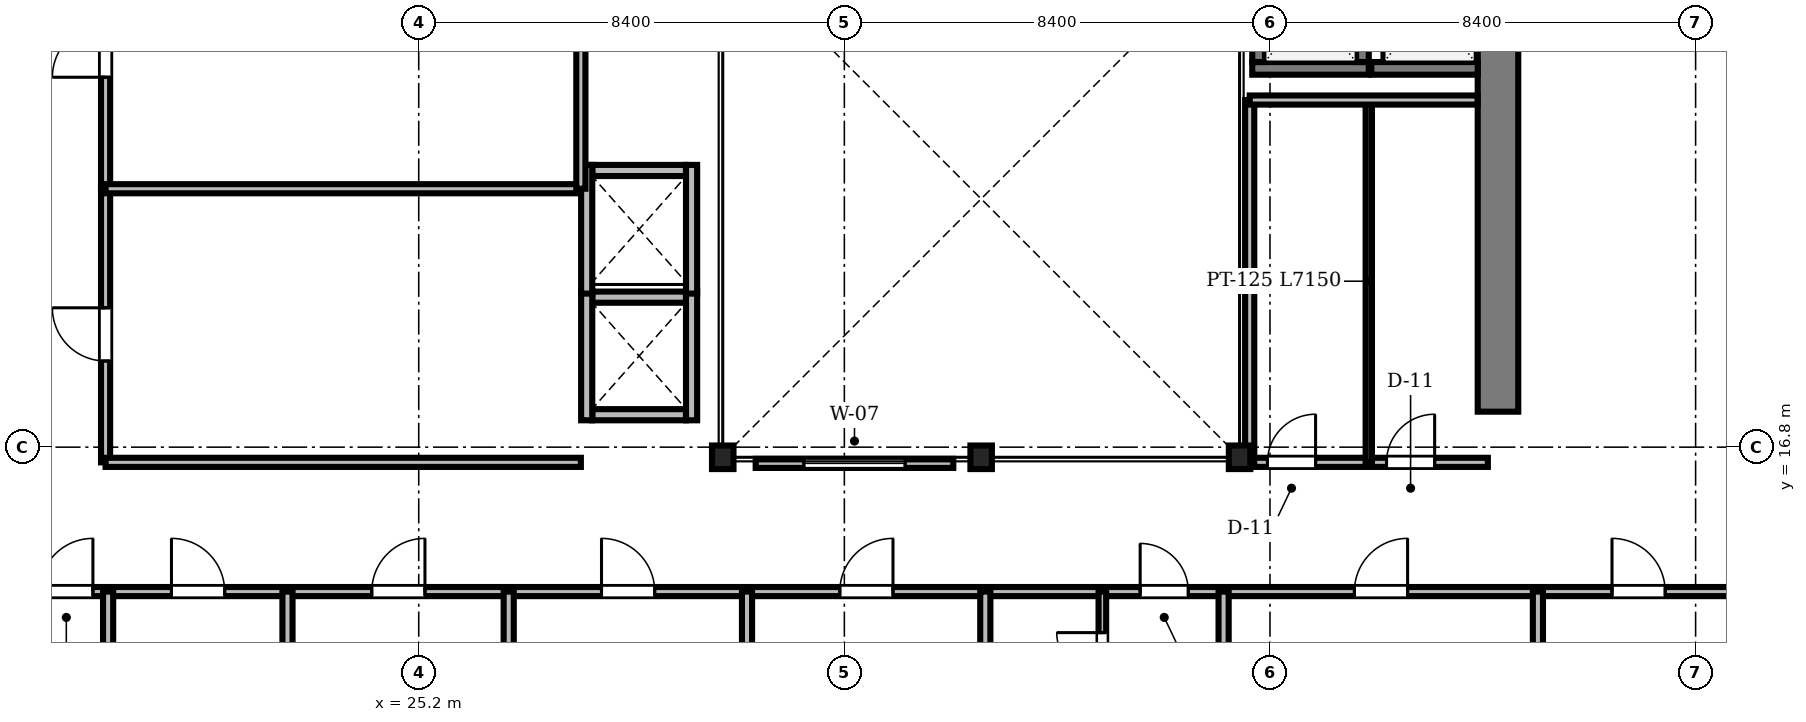
"""IFC4 building model, lengths in metres.
Left out: names, types, materials, properties, quantities, classifications, styles, units other than length and angle.
Written with IfcOpenShell. Run it as: python <this file> out.ifc"""

import sys

from ifc_helpers import new_model, si_unit, direction, frame, frame_2d, origin, origin_2d, place, context, subcontext, project, spatial, rectangle, i_section, extrude, source, transform, mapped, element, fill, save


model = new_model("IFC4")
c1 = context("Model", 3, precision=1e-05, world=origin(), true_north=direction((0.0, 1.0)))
c2 = subcontext(c1, "Body", "Model", "MODEL_VIEW")
j1 = project(units=[si_unit("LENGTHUNIT", "METRE"), si_unit("PLANEANGLEUNIT", "RADIAN")], contexts=[c1])
p1 = place(None, origin())
s1 = spatial("IfcSite", under=j1, at=p1, CompositionType="ELEMENT")
p2 = place(p1, origin())
s2 = spatial("IfcBuilding", under=s1, at=p2, CompositionType="ELEMENT")
p3 = place(p2, frame((0.0, 0.0, 155.7)))
s3 = spatial("IfcBuildingStorey", under=s2, at=p3, CompositionType="ELEMENT", Elevation=155.7)
m1 = source(origin(), c2, "Body", "SweptSolid", [
    extrude(rectangle(XDim=13.15, YDim=0.8, at=frame_2d((6.575, 0.0))), origin(), (0.0, 0.0, 1.0), 3.46),
])
p4 = place(p3, frame((46.5, 17.5, 0.0), z_axis=(0.0, 0.0, 1.0), x_axis=(0.0, 1.0, 0.0)))
e1 = element("IfcWall", 1, at=p4, inside=s3, PredefinedType="SHEAR", context=c2, shape_type="MappedRepresentation", body=[
    mapped(m1, transform((0.0, 0.0, 0.0), scale=1.0)),
])
m2 = source(origin(), c2, "Body", "SweptSolid", [
    extrude(i_section(OverallWidth=0.424, OverallDepth=0.465, WebThickness=0.035, FlangeThickness=0.056, FilletRadius=0.015, at=origin_2d()), origin(), (0.0, 0.0, 1.0), 3.46),
])
for number, where, z_axis, x_axis in (
    (2, (31.2, 16.6, 0.0), (0.0, 0.0, 1.0), (1.0, 0.0, 0.0)),
    (3, (36.3, 16.6, 0.0), (0.0, 0.0, 1.0), (1.0, 0.0, 0.0)),
    (4, (41.4, 16.6, 0.0), (0.0, 0.0, 1.0), (1.0, 0.0, 0.0)),
):
    element("IfcColumn", number, at=place(p3, frame(where, z_axis=z_axis, x_axis=x_axis)), inside=s3, PredefinedType="COLUMN", context=c2, shape_type="MappedRepresentation", body=[
        mapped(m2, transform((0.0, 0.0, 0.0), scale=1.0)),
    ])
m3 = source(origin(), c2, "Body", "SweptSolid", [
    extrude(rectangle(XDim=1.85, YDim=0.22, at=frame_2d((0.925, 0.0))), origin(), (0.0, 0.0, 1.0), 3.46),
])
for number, where, z_axis, x_axis in (
    (5, (28.625, 17.44, 0.0), (0.0, 0.0, 1.0), (1.0, 0.0, 0.0)),
    (6, (28.625, 19.76, 0.0), (0.0, 0.0, 1.0), (1.0, 0.0, 0.0)),
):
    element("IfcWall", number, at=place(p3, frame(where, z_axis=z_axis, x_axis=x_axis)), inside=s3, PredefinedType="SOLIDWALL", context=c2, shape_type="MappedRepresentation", body=[
        mapped(m3, transform((0.0, 0.0, 0.0), scale=1.0)),
    ])
m4 = source(origin(), c2, "Body", "SweptSolid", [
    extrude(rectangle(XDim=2.54, YDim=0.22, at=frame_2d((1.27, 0.0))), origin(), (0.0, 0.0, 1.0), 3.46),
])
for number, where, z_axis, x_axis in (
    (7, (28.515, 17.33, 0.0), (0.0, 0.0, 1.0), (0.0, 1.0, 0.0)),
    (8, (30.585, 17.33, 0.0), (0.0, 0.0, 1.0), (0.0, 1.0, 0.0)),
):
    element("IfcWall", number, at=place(p3, frame(where, z_axis=z_axis, x_axis=x_axis)), inside=s3, PredefinedType="SOLIDWALL", context=c2, shape_type="MappedRepresentation", body=[
        mapped(m4, transform((0.0, 0.0, 0.0), scale=1.0)),
    ])
p5 = place(p3, frame((28.625, 22.26, 0.0), z_axis=(0.0, 0.0, 1.0), x_axis=(1.0, 0.0, 0.0)))
e9 = element("IfcWall", 9, at=p5, inside=s3, PredefinedType="SOLIDWALL", context=c2, shape_type="MappedRepresentation", body=[
    mapped(m3, transform((0.0, 0.0, 0.0), scale=1.0)),
])
for number, where, z_axis, x_axis in (
    (10, (28.515, 19.83, 0.0), (0.0, 0.0, 1.0), (0.0, 1.0, 0.0)),
    (11, (30.585, 19.83, 0.0), (0.0, 0.0, 1.0), (0.0, 1.0, 0.0)),
):
    element("IfcWall", number, at=place(p3, frame(where, z_axis=z_axis, x_axis=x_axis)), inside=s3, PredefinedType="SOLIDWALL", context=c2, shape_type="MappedRepresentation", body=[
        mapped(m4, transform((0.0, 0.0, 0.0), scale=1.0)),
    ])
m5 = source(origin(), c2, "Body", "SweptSolid", [
    extrude(rectangle(XDim=2.3, YDim=0.25, at=frame_2d((1.15, 0.0))), origin(), (0.0, 0.0, 1.0), 3.46),
])
for number, where, z_axis, x_axis in (
    (12, (41.65, 24.275, 0.0), (0.0, 0.0, 1.0), (1.0, 0.0, 0.0)),
    (13, (41.775, 24.4, 0.0), (0.0, 0.0, 1.0), (0.0, 1.0, 0.0)),
    (14, (43.825, 24.4, 0.0), (0.0, 0.0, 1.0), (0.0, 1.0, 0.0)),
):
    element("IfcWall", number, at=place(p3, frame(where, z_axis=z_axis, x_axis=x_axis)), inside=s3, PredefinedType="SOLIDWALL", context=c2, shape_type="MappedRepresentation", body=[
        mapped(m5, transform((0.0, 0.0, 0.0), scale=1.0)),
    ])
m6 = source(origin(), c2, "Body", "SweptSolid", [
    extrude(rectangle(XDim=2.1, YDim=0.25, at=frame_2d((1.05, 0.0))), origin(), (0.0, 0.0, 1.0), 3.46),
])
p6 = place(p3, frame((44.0, 24.275, 0.0), z_axis=(0.0, 0.0, 1.0), x_axis=(1.0, 0.0, 0.0)))
e15 = element("IfcWall", 15, at=p6, inside=s3, PredefinedType="SOLIDWALL", context=c2, shape_type="MappedRepresentation", body=[
    mapped(m6, transform((0.0, 0.0, 0.0), scale=1.0)),
])
m7 = source(origin(), c2, "Body", "SweptSolid", [
    extrude(rectangle(XDim=46.156, YDim=0.18, at=frame_2d((23.078, 0.0))), origin(), (0.0, 0.0, 1.0), 2.702),
])
p7 = place(p3, frame((6.922, 13.95, 0.0), z_axis=(0.0, 0.0, 1.0), x_axis=(1.0, 0.0, 0.0)))
e16 = element("IfcWall", 16, at=p7, inside=s3, PredefinedType="PARTITIONING", context=c2, shape_type="MappedRepresentation", body=[
    mapped(m7, transform((0.0, 0.0, 0.0), scale=1.0)),
])
m8 = source(origin(), c2, "Body", "SweptSolid", [
    extrude(rectangle(XDim=1.05, YDim=2.2, at=frame_2d((0.525, 1.1))), frame((0.0, 0.1, 0.0), z_axis=(0.0, -1.0, 0.0), x_axis=(1.0, 0.0, 0.0)), (0.0, 0.0, 1.0), 0.2),
])
p8 = place(p7, frame((10.798, 0.0, 0.0)))
e17 = element("IfcOpeningElement", 17, at=p8, cuts=e16, PredefinedType="OPENING", context=c2, shape_type="MappedRepresentation", body=[
    mapped(m8, transform((0.0, 0.0, 0.0), scale=1.0)),
])
p9 = place(p7, frame((13.398, 0.0, 0.0)))
e18 = element("IfcOpeningElement", 18, at=p9, cuts=e16, PredefinedType="OPENING", context=c2, shape_type="MappedRepresentation", body=[
    mapped(m8, transform((0.0, 0.0, 0.0), scale=1.0)),
])
p10 = place(p7, frame((17.351, 0.0, 0.0)))
e19 = element("IfcOpeningElement", 19, at=p10, cuts=e16, PredefinedType="OPENING", context=c2, shape_type="MappedRepresentation", body=[
    mapped(m8, transform((0.0, 0.0, 0.0), scale=1.0)),
])
p11 = place(p7, frame((21.885, 0.0, 0.0)))
e20 = element("IfcOpeningElement", 20, at=p11, cuts=e16, PredefinedType="OPENING", context=c2, shape_type="MappedRepresentation", body=[
    mapped(m8, transform((0.0, 0.0, 0.0), scale=1.0)),
])
p12 = place(p7, frame((26.588, 0.0, 0.0)))
e21 = element("IfcOpeningElement", 21, at=p12, cuts=e16, PredefinedType="OPENING", context=c2, shape_type="MappedRepresentation", body=[
    mapped(m8, transform((0.0, 0.0, 0.0), scale=1.0)),
])
m9 = source(origin(), c2, "Body", "SweptSolid", [
    extrude(rectangle(XDim=0.95, YDim=2.15, at=frame_2d((0.475, 1.075))), frame((0.0, 0.1, 0.0), z_axis=(0.0, -1.0, 0.0), x_axis=(1.0, 0.0, 0.0)), (0.0, 0.0, 1.0), 0.2),
])
p13 = place(p7, frame((32.516, 0.0, 0.0)))
e22 = element("IfcOpeningElement", 22, at=p13, cuts=e16, PredefinedType="OPENING", context=c2, shape_type="MappedRepresentation", body=[
    mapped(m9, transform((0.0, 0.0, 0.0), scale=1.0)),
])
p14 = place(p7, frame((36.744, 0.0, 0.0)))
e23 = element("IfcOpeningElement", 23, at=p14, cuts=e16, PredefinedType="OPENING", context=c2, shape_type="MappedRepresentation", body=[
    mapped(m8, transform((0.0, 0.0, 0.0), scale=1.0)),
])
p15 = place(p7, frame((41.828, 0.0, 0.0)))
e24 = element("IfcOpeningElement", 24, at=p15, cuts=e16, PredefinedType="OPENING", context=c2, shape_type="MappedRepresentation", body=[
    mapped(m8, transform((0.0, 0.0, 0.0), scale=1.0)),
])
m10 = source(origin(), c2, "Body", "SweptSolid", [
    extrude(rectangle(XDim=6.54, YDim=0.18, at=frame_2d((3.27, 0.0))), origin(), (0.0, 0.0, 1.0), 2.852),
])
p16 = place(p3, frame((19.02, 21.9, 0.0), z_axis=(0.0, 0.0, 1.0), x_axis=(0.0, 1.0, 0.0)))
e25 = element("IfcWall", 25, at=p16, inside=s3, PredefinedType="PARTITIONING", context=c2, shape_type="MappedRepresentation", body=[
    mapped(m10, transform((0.0, 0.0, 0.0), scale=1.0)),
])
p17 = place(p16, frame((2.2, 0.0, 0.0)))
e26 = element("IfcOpeningElement", 26, at=p17, cuts=e25, PredefinedType="OPENING", context=c2, shape_type="MappedRepresentation", body=[
    mapped(m8, transform((0.0, 0.0, 0.0), scale=1.0)),
])
m11 = source(origin(), c2, "Body", "SweptSolid", [
    extrude(rectangle(XDim=5.4, YDim=0.18, at=frame_2d((2.7, 0.0))), origin(), (0.0, 0.0, 1.0), 2.852),
])
p18 = place(p3, frame((19.02, 16.5, 0.0), z_axis=(0.0, 0.0, 1.0), x_axis=(0.0, 1.0, 0.0)))
e27 = element("IfcWall", 27, at=p18, inside=s3, PredefinedType="PARTITIONING", context=c2, shape_type="MappedRepresentation", body=[
    mapped(m11, transform((0.0, 0.0, 0.0), scale=1.0)),
])
p19 = place(p18, frame((2.0, 0.0, 0.0)))
e28 = element("IfcOpeningElement", 28, at=p19, cuts=e27, PredefinedType="OPENING", context=c2, shape_type="MappedRepresentation", body=[
    mapped(m8, transform((0.0, 0.0, 0.0), scale=1.0)),
])
m12 = source(origin(), c2, "Body", "SweptSolid", [
    extrude(rectangle(XDim=4.7, YDim=0.18, at=frame_2d((2.35, 0.0))), origin(), (0.0, 0.0, 1.0), 2.852),
])
p20 = place(p3, frame((41.6, 16.5, 0.0), z_axis=(0.0, 0.0, 1.0), x_axis=(1.0, 0.0, 0.0)))
e29 = element("IfcWall", 29, at=p20, inside=s3, PredefinedType="PARTITIONING", context=c2, shape_type="MappedRepresentation", body=[
    mapped(m12, transform((0.0, 0.0, 0.0), scale=1.0)),
])
p21 = place(p20, frame((0.35, 0.0, 0.0)))
e30 = element("IfcOpeningElement", 30, at=p21, cuts=e29, PredefinedType="OPENING", context=c2, shape_type="MappedRepresentation", body=[
    mapped(m9, transform((0.0, 0.0, 0.0), scale=1.0)),
])
p22 = place(p20, frame((2.7, 0.0, 0.0)))
e31 = element("IfcOpeningElement", 31, at=p22, cuts=e29, PredefinedType="OPENING", context=c2, shape_type="MappedRepresentation", body=[
    mapped(m9, transform((0.0, 0.0, 0.0), scale=1.0)),
])
m13 = source(origin(), c2, "Body", "SweptSolid", [
    extrude(rectangle(XDim=2.36, YDim=0.15, at=frame_2d((1.18, 0.0))), origin(), (0.0, 0.0, 1.0), 3.122),
])
p23 = place(p3, frame((38.692, 11.59, 0.0), z_axis=(0.0, 0.0, 1.0), x_axis=(0.0, 1.0, 0.0)))
e32 = element("IfcWall", 32, at=p23, inside=s3, PredefinedType="PARTITIONING", context=c2, shape_type="MappedRepresentation", body=[
    mapped(m13, transform((0.0, 0.0, 0.0), scale=1.0)),
])
m14 = source(origin(), c2, "Body", "SweptSolid", [
    extrude(rectangle(XDim=0.9, YDim=2.1, at=frame_2d((0.45, 1.05))), frame((0.0, 0.085, 0.0), z_axis=(0.0, -1.0, 0.0), x_axis=(1.0, 0.0, 0.0)), (0.0, 0.0, 1.0), 0.17),
])
p24 = place(p23, frame((0.65, 0.0, 0.0)))
e33 = element("IfcOpeningElement", 33, at=p24, cuts=e32, PredefinedType="OPENING", context=c2, shape_type="MappedRepresentation", body=[
    mapped(m14, transform((0.0, 0.0, 0.0), scale=1.0)),
])
m15 = source(origin(), c2, "Body", "SweptSolid", [
    extrude(rectangle(XDim=11.828, YDim=0.2, at=frame_2d((5.914, 0.0))), origin(), (0.0, 0.0, 1.0), 2.702),
])
for number, where, z_axis, x_axis in (
    (34, (19.07, 2.122, 0.0), (0.0, 0.0, 1.0), (0.0, 1.0, 0.0)),
    (35, (22.61, 2.122, 0.0), (0.0, 0.0, 1.0), (0.0, 1.0, 0.0)),
):
    element("IfcWall", number, at=place(p3, frame(where, z_axis=z_axis, x_axis=x_axis)), inside=s3, PredefinedType="PARTITIONING", context=c2, shape_type="MappedRepresentation", body=[
        mapped(m15, transform((0.0, 0.0, 0.0), scale=1.0)),
    ])
m16 = source(origin(), c2, "Body", "SweptSolid", [
    extrude(rectangle(XDim=12.02, YDim=0.2, at=frame_2d((6.01, 0.0))), origin(), (0.0, 0.0, 1.0), 2.702),
])
for number, where, z_axis, x_axis in (
    (36, (26.976, 1.93, 0.0), (0.0, 0.0, 1.0), (0.0, 1.0, 0.0)),
    (37, (31.679, 1.93, 0.0), (0.0, 0.0, 1.0), (0.0, 1.0, 0.0)),
):
    element("IfcWall", number, at=place(p3, frame(where, z_axis=z_axis, x_axis=x_axis)), inside=s3, PredefinedType="PARTITIONING", context=c2, shape_type="MappedRepresentation", body=[
        mapped(m16, transform((0.0, 0.0, 0.0), scale=1.0)),
    ])
for number, where, z_axis, x_axis in (
    (38, (36.382, 2.122, 0.0), (0.0, 0.0, 1.0), (0.0, 1.0, 0.0)),
    (39, (41.085, 2.122, 0.0), (0.0, 0.0, 1.0), (0.0, 1.0, 0.0)),
    (40, (47.288, 2.122, 0.0), (0.0, 0.0, 1.0), (0.0, 1.0, 0.0)),
):
    element("IfcWall", number, at=place(p3, frame(where, z_axis=z_axis, x_axis=x_axis)), inside=s3, PredefinedType="PARTITIONING", context=c2, shape_type="MappedRepresentation", body=[
        mapped(m15, transform((0.0, 0.0, 0.0), scale=1.0)),
    ])
m17 = source(origin(), c2, "Body", "SweptSolid", [
    extrude(rectangle(XDim=9.38, YDim=0.18, at=frame_2d((4.69, 0.0))), origin(), (0.0, 0.0, 1.0), 3.46),
])
for number, where, z_axis, x_axis in (
    (41, (19.02, 16.5, 0.0), (0.0, 0.0, 1.0), (1.0, 0.0, 0.0)),
    (42, (19.02, 21.9, 0.0), (0.0, 0.0, 1.0), (1.0, 0.0, 0.0)),
):
    element("IfcWall", number, at=place(p3, frame(where, z_axis=z_axis, x_axis=x_axis)), inside=s3, PredefinedType="PARTITIONING", context=c2, shape_type="MappedRepresentation", body=[
        mapped(m17, transform((0.0, 0.0, 0.0), scale=1.0)),
    ])
m18 = source(origin(), c2, "Body", "SweptSolid", [
    extrude(rectangle(XDim=7.15, YDim=0.18, at=frame_2d((3.575, 0.0))), origin(), (0.0, 0.0, 1.0), 2.852),
])
p25 = place(p3, frame((41.6, 16.5, 0.0), z_axis=(0.0, 0.0, 1.0), x_axis=(0.0, 1.0, 0.0)))
e43 = element("IfcWall", 43, at=p25, inside=s3, PredefinedType="PARTITIONING", context=c2, shape_type="MappedRepresentation", body=[
    mapped(m18, transform((0.0, 0.0, 0.0), scale=1.0)),
])
m19 = source(origin(), c2, "Body", "SweptSolid", [
    extrude(rectangle(XDim=7.15, YDim=0.125, at=frame_2d((3.575, 0.0))), origin(), (0.0, 0.0, 1.0), 2.852),
])
p26 = place(p3, frame((43.95, 16.5, 0.0), z_axis=(0.0, 0.0, 1.0), x_axis=(0.0, 1.0, 0.0)))
e44 = element("IfcWall", 44, at=p26, inside=s3, PredefinedType="PARTITIONING", context=c2, shape_type="MappedRepresentation", body=[
    mapped(m19, transform((0.0, 0.0, 0.0), scale=1.0)),
])
p27 = place(p3, frame((28.4, 21.9, 0.0), z_axis=(0.0, 0.0, 1.0), x_axis=(0.0, 1.0, 0.0)))
e45 = element("IfcWall", 45, at=p27, inside=s3, PredefinedType="PARTITIONING", context=c2, shape_type="MappedRepresentation", body=[
    mapped(m10, transform((0.0, 0.0, 0.0), scale=1.0)),
])
m20 = source(origin(), c2, "Body", "SweptSolid", [
    extrude(rectangle(XDim=4.498, YDim=0.18, at=frame_2d((2.249, 0.0))), origin(), (0.0, 0.0, 1.0), 3.46),
])
p28 = place(p3, frame((41.6, 23.65, 0.0), z_axis=(0.0, 0.0, 1.0), x_axis=(1.0, 0.0, 0.0)))
e46 = element("IfcWall", 46, at=p28, inside=s3, PredefinedType="PARTITIONING", context=c2, shape_type="MappedRepresentation", body=[
    mapped(m20, transform((0.0, 0.0, 0.0), scale=1.0)),
])
m21 = source(origin(), c2, "Body", "SweptSolid", [
    extrude(rectangle(XDim=3.9, YDim=0.18, at=frame_2d((1.95, 0.0))), origin(), (0.0, 0.0, 1.0), 3.002),
])
p29 = place(p3, frame((31.85, 16.48, 0.0), z_axis=(0.0, 0.0, 1.0), x_axis=(1.0, 0.0, 0.0)))
e47 = element("IfcWall", 47, at=p29, inside=s3, PredefinedType="PARTITIONING", context=c2, shape_type="MappedRepresentation", body=[
    mapped(m21, transform((0.0, 0.0, 0.0), scale=1.0)),
])
m22 = source(origin(), c2, "Body", "SweptSolid", [
    extrude(rectangle(XDim=2.0, YDim=1.9, at=frame_2d((1.0, 0.95))), frame((0.0, 0.1, 0.0), z_axis=(0.0, -1.0, 0.0), x_axis=(1.0, 0.0, 0.0)), (0.0, 0.0, 1.0), 0.2),
])
p30 = place(p29, frame((0.95, 0.0, 0.55)))
e48 = element("IfcOpeningElement", 48, at=p30, cuts=e47, PredefinedType="OPENING", context=c2, shape_type="MappedRepresentation", body=[
    mapped(m22, transform((0.0, 0.0, 0.0), scale=1.0)),
])
m23 = source(origin(), c2, "Body", "SweptSolid", [
    extrude(rectangle(XDim=1.05, YDim=2.2, at=frame_2d((0.525, 1.1))), frame((0.0, 0.025, 0.0), z_axis=(0.0, -1.0, 0.0), x_axis=(1.0, 0.0, 0.0)), (0.0, 0.0, 1.0), 0.05),
])
p31 = place(p8, origin())
e49 = element("IfcDoor", 49, at=p31, inside=s3, OperationType="SINGLE_SWING_RIGHT", PredefinedType="DOOR", context=c2, shape_type="MappedRepresentation", body=[
    mapped(m23, transform((0.0, 0.0, 0.0), scale=1.0)),
])
fill(e17, e49)
p32 = place(p9, origin())
e50 = element("IfcDoor", 50, at=p32, inside=s3, OperationType="SINGLE_SWING_LEFT", PredefinedType="DOOR", context=c2, shape_type="MappedRepresentation", body=[
    mapped(m23, transform((0.0, 0.0, 0.0), scale=1.0)),
])
fill(e18, e50)
p33 = place(p10, origin())
e51 = element("IfcDoor", 51, at=p33, inside=s3, OperationType="SINGLE_SWING_RIGHT", PredefinedType="DOOR", context=c2, shape_type="MappedRepresentation", body=[
    mapped(m23, transform((0.0, 0.0, 0.0), scale=1.0)),
])
fill(e19, e51)
p34 = place(p11, origin())
e52 = element("IfcDoor", 52, at=p34, inside=s3, OperationType="SINGLE_SWING_LEFT", PredefinedType="DOOR", context=c2, shape_type="MappedRepresentation", body=[
    mapped(m23, transform((0.0, 0.0, 0.0), scale=1.0)),
])
fill(e20, e52)
p35 = place(p12, origin())
e53 = element("IfcDoor", 53, at=p35, inside=s3, OperationType="SINGLE_SWING_RIGHT", PredefinedType="DOOR", context=c2, shape_type="MappedRepresentation", body=[
    mapped(m23, transform((0.0, 0.0, 0.0), scale=1.0)),
])
fill(e21, e53)
m24 = source(origin(), c2, "Body", "SweptSolid", [
    extrude(rectangle(XDim=0.95, YDim=2.15, at=frame_2d((0.475, 1.075))), frame((0.0, 0.025, 0.0), z_axis=(0.0, -1.0, 0.0), x_axis=(1.0, 0.0, 0.0)), (0.0, 0.0, 1.0), 0.05),
])
p36 = place(p13, origin())
e54 = element("IfcDoor", 54, at=p36, inside=s3, OperationType="SINGLE_SWING_LEFT", PredefinedType="DOOR", context=c2, shape_type="MappedRepresentation", body=[
    mapped(m24, transform((0.0, 0.0, 0.0), scale=1.0)),
])
fill(e22, e54)
p37 = place(p14, origin())
e55 = element("IfcDoor", 55, at=p37, inside=s3, OperationType="SINGLE_SWING_RIGHT", PredefinedType="DOOR", context=c2, shape_type="MappedRepresentation", body=[
    mapped(m23, transform((0.0, 0.0, 0.0), scale=1.0)),
])
fill(e23, e55)
p38 = place(p15, origin())
e56 = element("IfcDoor", 56, at=p38, inside=s3, OperationType="SINGLE_SWING_LEFT", PredefinedType="DOOR", context=c2, shape_type="MappedRepresentation", body=[
    mapped(m23, transform((0.0, 0.0, 0.0), scale=1.0)),
])
fill(e24, e56)
p39 = place(p17, origin())
e57 = element("IfcDoor", 57, at=p39, inside=s3, OperationType="SINGLE_SWING_LEFT", PredefinedType="DOOR", context=c2, shape_type="MappedRepresentation", body=[
    mapped(m23, transform((0.0, 0.0, 0.0), scale=1.0)),
])
fill(e26, e57)
p40 = place(p19, origin())
e58 = element("IfcDoor", 58, at=p40, inside=s3, OperationType="SINGLE_SWING_RIGHT", PredefinedType="DOOR", context=c2, shape_type="MappedRepresentation", body=[
    mapped(m23, transform((0.0, 0.0, 0.0), scale=1.0)),
])
fill(e28, e58)
p41 = place(p21, origin())
e59 = element("IfcDoor", 59, at=p41, inside=s3, OperationType="SINGLE_SWING_RIGHT", PredefinedType="DOOR", context=c2, shape_type="MappedRepresentation", body=[
    mapped(m24, transform((0.0, 0.0, 0.0), scale=1.0)),
])
fill(e30, e59)
p42 = place(p22, origin())
e60 = element("IfcDoor", 60, at=p42, inside=s3, OperationType="SINGLE_SWING_RIGHT", PredefinedType="DOOR", context=c2, shape_type="MappedRepresentation", body=[
    mapped(m24, transform((0.0, 0.0, 0.0), scale=1.0)),
])
fill(e31, e60)
m25 = source(origin(), c2, "Body", "SweptSolid", [
    extrude(rectangle(XDim=0.9, YDim=2.1, at=frame_2d((0.45, 1.05))), frame((0.0, 0.025, 0.0), z_axis=(0.0, -1.0, 0.0), x_axis=(1.0, 0.0, 0.0)), (0.0, 0.0, 1.0), 0.05),
])
p43 = place(p24, origin())
e61 = element("IfcDoor", 61, at=p43, inside=s3, OperationType="SINGLE_SWING_RIGHT", PredefinedType="DOOR", context=c2, shape_type="MappedRepresentation", body=[
    mapped(m25, transform((0.0, 0.0, 0.0), scale=1.0)),
])
fill(e33, e61)
m26 = source(origin(), c2, "Body", "SweptSolid", [
    extrude(rectangle(XDim=2.0, YDim=1.9, at=frame_2d((1.0, 0.95))), frame((0.0, 0.03, 0.0), z_axis=(0.0, -1.0, 0.0), x_axis=(1.0, 0.0, 0.0)), (0.0, 0.0, 1.0), 0.06),
])
p44 = place(p30, origin())
e62 = element("IfcWindow", 62, at=p44, inside=s3, PartitioningType="SINGLE_PANEL", PredefinedType="WINDOW", context=c2, shape_type="MappedRepresentation", body=[
    mapped(m26, transform((0.0, 0.0, 0.0), scale=1.0)),
])
fill(e48, e62)
save(model, sys.argv[1])
